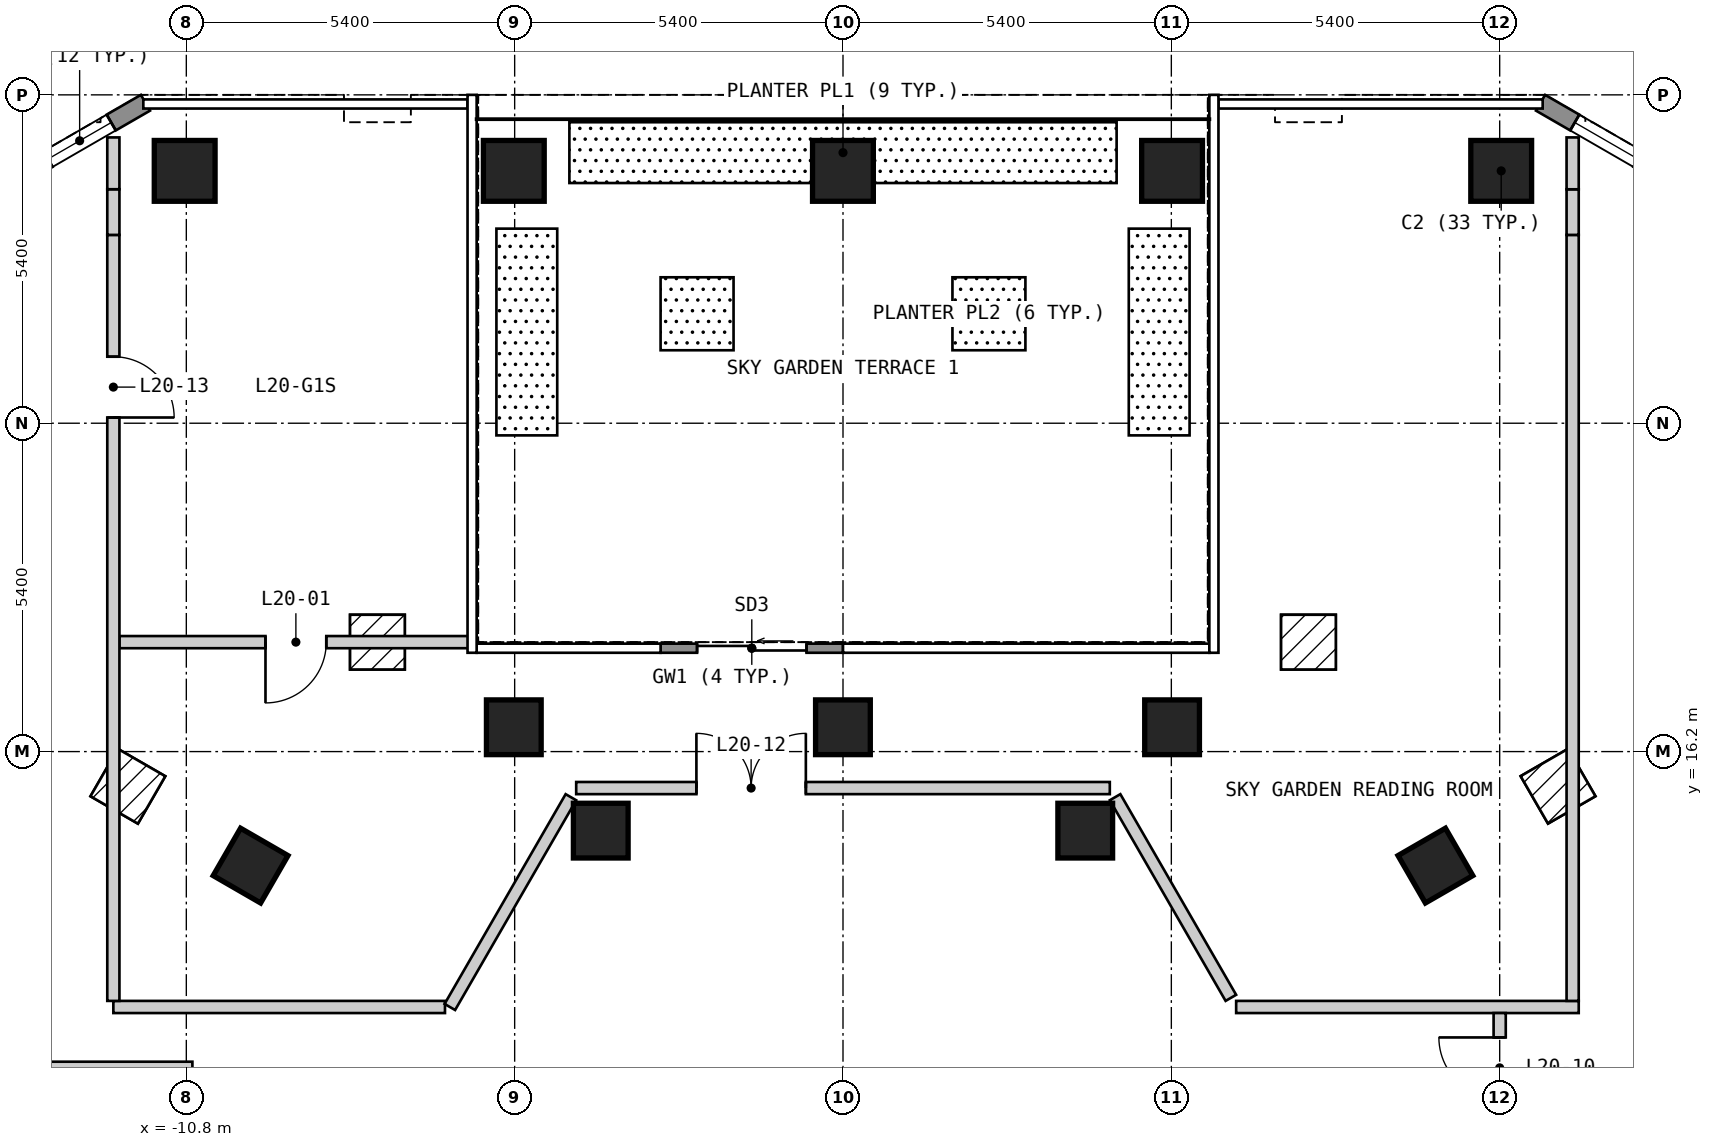
"""IFC4 building model, lengths in metres.
Left out: names, types, materials, properties, quantities, classifications, styles, units other than length and angle.
Written with IfcOpenShell. Run it as: python <this file> out.ifc"""

import sys

from ifc_helpers import new_model, si_unit, direction, frame, frame_2d, origin, origin_2d, place, context, subcontext, project, spatial, polyline, rectangle, outline, extrude, element, fill, save


model = new_model("IFC4")
c1 = context("Model", 3, precision=1e-05, world=origin(), true_north=direction((0.0, 1.0)))
c2 = subcontext(c1, "Body", "Model", "MODEL_VIEW")
j1 = project(units=[si_unit("LENGTHUNIT", "METRE"), si_unit("PLANEANGLEUNIT", "RADIAN")], contexts=[c1])
p1 = place(None, origin())
s1 = spatial("IfcSite", under=j1, at=p1, CompositionType="ELEMENT")
p2 = place(p1, origin())
s2 = spatial("IfcBuilding", under=s1, at=p2, CompositionType="ELEMENT")
p3 = place(p2, frame((0.0, 0.0, 66.0)))
s3 = spatial("IfcBuildingStorey", under=s2, at=p3, CompositionType="ELEMENT", Elevation=66.0)
for number, where, z_axis, x_axis in (
    (1, (10.825, 25.75, 0.0), (0.0, 0.0, 1.0), (-1.0, 0.0, 0.0)),
    (2, (5.412, 25.75, 0.0), (0.0, 0.0, 1.0), (-1.0, 0.0, 0.0)),
    (3, (-0.001, 25.75, 0.0), (0.0, 0.0, 1.0), (-1.0, 0.0, 0.0)),
    (4, (-5.414, 25.75, 0.0), (0.0, 0.0, 1.0), (-1.0, 0.0, 0.0)),
    (5, (-10.827, 25.75, 0.0), (0.0, 0.0, 1.0), (-1.0, 0.0, 0.0)),
):
    element("IfcColumn", number, at=place(p3, frame(where, z_axis=z_axis, x_axis=x_axis)), inside=s3, PredefinedType="COLUMN", context=c2, shape_type="SweptSolid", body=[
        extrude(rectangle(XDim=1.0, YDim=1.0, at=origin_2d()), origin(), (0.0, 0.0, 1.0), 6.0),
    ])
for number, where, z_axis, x_axis in (
    (6, (9.743, 14.325, 0.0), (0.0, 0.0, 1.0), (-0.5, 0.866, 0.0)),
    (7, (5.412, 16.6, 0.0), (0.0, 0.0, 1.0), (-1.0, 0.0, 0.0)),
    (8, (3.984, 14.9, 0.0), (0.0, 0.0, 1.0), (1.0, 0.0, 0.0)),
    (9, (-0.001, 16.6, 0.0), (0.0, 0.0, 1.0), (-1.0, 0.0, 0.0)),
    (10, (-3.984, 14.9, 0.0), (0.0, 0.0, 1.0), (1.0, 0.0, 0.0)),
    (11, (-5.414, 16.6, 0.0), (0.0, 0.0, 1.0), (-1.0, 0.0, 0.0)),
    (12, (-9.743, 14.325, 0.0), (0.0, 0.0, 1.0), (-0.5, -0.866, 0.0)),
):
    element("IfcColumn", number, at=place(p3, frame(where, z_axis=z_axis, x_axis=x_axis)), inside=s3, PredefinedType="COLUMN", context=c2, shape_type="SweptSolid", body=[
        extrude(rectangle(XDim=0.9, YDim=0.9, at=origin_2d()), origin(), (0.0, 0.0, 1.0), 6.0),
    ])
p4 = place(p3, frame((-11.472, 26.87, 0.0), z_axis=(0.0, 0.0, 1.0), x_axis=(-0.866022959057, -0.500004234368, 0.0)))
e13 = element("IfcWall", 13, at=p4, inside=s3, PredefinedType="SOLIDWALL", context=c2, shape_type="SweptSolid", body=[
    extrude(outline(polyline([(0.0, -0.15), (5.0, -0.15), (4.92, 0.15), (0.08, 0.15), (0.0, -0.15)])), origin(), (0.0, 0.0, 1.0), 5.7),
])
p5 = place(p4, frame((0.65, 0.0, 0.15)))
e14 = element("IfcOpeningElement", 14, at=p5, cuts=e13, PredefinedType="OPENING", context=c2, shape_type="SweptSolid", body=[
    extrude(rectangle(XDim=1.2, YDim=2.1, at=frame_2d((0.6, 1.05))), frame((0.0, 0.16, 0.0), z_axis=(0.0, -1.0, 0.0), x_axis=(1.0, 0.0, 0.0)), (0.0, 0.0, 1.0), 0.32),
])
p6 = place(p4, frame((3.149, 0.0, 0.15)))
e15 = element("IfcOpeningElement", 15, at=p6, cuts=e13, PredefinedType="OPENING", context=c2, shape_type="SweptSolid", body=[
    extrude(rectangle(XDim=1.2, YDim=2.1, at=frame_2d((0.6, 1.05))), frame((0.0, 0.16, 0.0), z_axis=(0.0, -1.0, 0.0), x_axis=(1.0, 0.0, 0.0)), (0.0, 0.0, 1.0), 0.32),
])
p7 = place(p3, frame((15.802, 24.37, 0.0), z_axis=(0.0, 0.0, 1.0), x_axis=(-0.866022959057, 0.500004234368, 0.0)))
e16 = element("IfcWall", 16, at=p7, inside=s3, PredefinedType="SOLIDWALL", context=c2, shape_type="SweptSolid", body=[
    extrude(outline(polyline([(0.0, -0.15), (5.0, -0.15), (4.92, 0.15), (0.08, 0.15), (0.0, -0.15)])), origin(), (0.0, 0.0, 1.0), 5.7),
])
p8 = place(p7, frame((0.65, 0.0, 0.15)))
e17 = element("IfcOpeningElement", 17, at=p8, cuts=e16, PredefinedType="OPENING", context=c2, shape_type="SweptSolid", body=[
    extrude(rectangle(XDim=1.2, YDim=2.1, at=frame_2d((0.6, 1.05))), frame((0.0, 0.16, 0.0), z_axis=(0.0, -1.0, 0.0), x_axis=(1.0, 0.0, 0.0)), (0.0, 0.0, 1.0), 0.32),
])
p9 = place(p7, frame((3.15, 0.0, 0.15)))
e18 = element("IfcOpeningElement", 18, at=p9, cuts=e16, PredefinedType="OPENING", context=c2, shape_type="SweptSolid", body=[
    extrude(rectangle(XDim=1.2, YDim=2.1, at=frame_2d((0.6, 1.05))), frame((0.0, 0.16, 0.0), z_axis=(0.0, -1.0, 0.0), x_axis=(1.0, 0.0, 0.0)), (0.0, 0.0, 1.0), 0.32),
])
p10 = place(p3, frame((0.0, 17.9, 0.0), z_axis=(0.0, 0.0, 1.0), x_axis=(-1.0, 0.0, 0.0)))
e19 = element("IfcWall", 19, at=p10, inside=s3, PredefinedType="SOLIDWALL", context=c2, shape_type="SweptSolid", body=[
    extrude(rectangle(XDim=3.0, YDim=0.15, at=frame_2d((1.5, 0.0))), origin(), (0.0, 0.0, 1.0), 5.7),
])
p11 = place(p10, frame((0.6, 0.0, 0.0)))
e20 = element("IfcOpeningElement", 20, at=p11, cuts=e19, PredefinedType="OPENING", context=c2, shape_type="SweptSolid", body=[
    extrude(rectangle(XDim=1.8, YDim=2.4, at=frame_2d((0.9, 1.2))), frame((0.0, 0.085, 0.0), z_axis=(0.0, -1.0, 0.0), x_axis=(1.0, 0.0, 0.0)), (0.0, 0.0, 1.0), 0.17),
])
p12 = place(p3, frame((-21.853, 11.0, 0.0), z_axis=(0.0, 0.0, 1.0), x_axis=(1.0, 0.0, 0.0)))
e21 = element("IfcWall", 21, at=p12, inside=s3, PredefinedType="PARTITIONING", context=c2, shape_type="SweptSolid", body=[
    extrude(rectangle(XDim=11.153, YDim=0.2, at=frame_2d((5.577, 0.0))), origin(), (0.0, 0.0, 1.0), 5.7),
])
p13 = place(p12, frame((5.691, 0.0, 0.0), z_axis=(0.0, 0.0, 1.0), x_axis=(-1.0, 0.0, 0.0)))
e22 = element("IfcOpeningElement", 22, at=p13, cuts=e21, PredefinedType="OPENING", context=c2, shape_type="SweptSolid", body=[
    extrude(rectangle(XDim=1.8, YDim=2.1, at=frame_2d((0.9, 1.05))), frame((0.0, 0.11, 0.0), z_axis=(0.0, -1.0, 0.0), x_axis=(1.0, 0.0, 0.0)), (0.0, 0.0, 1.0), 0.22),
])
p14 = place(p3, frame((-12.0, 12.0, 0.0), z_axis=(0.0, 0.0, 1.0), x_axis=(1.0, 0.0, 0.0)))
e23 = element("IfcWall", 23, at=p14, inside=s3, PredefinedType="PARTITIONING", context=c2, shape_type="SweptSolid", body=[
    extrude(rectangle(XDim=5.454, YDim=0.2, at=frame_2d((2.727, 0.0))), origin(), (0.0, 0.0, 1.0), 5.7),
])
p15 = place(p3, frame((6.466, 12.0, 0.0), z_axis=(0.0, 0.0, 1.0), x_axis=(1.0, 0.0, 0.0)))
e24 = element("IfcWall", 24, at=p15, inside=s3, PredefinedType="PARTITIONING", context=c2, shape_type="SweptSolid", body=[
    extrude(rectangle(XDim=5.634, YDim=0.2, at=frame_2d((2.817, 0.0))), origin(), (0.0, 0.0, 1.0), 5.7),
])
p16 = place(p3, frame((-4.388, 15.6, 0.0), z_axis=(0.0, 0.0, 1.0), x_axis=(1.0, 0.0, 0.0)))
e25 = element("IfcWall", 25, at=p16, inside=s3, PredefinedType="PARTITIONING", context=c2, shape_type="SweptSolid", body=[
    extrude(rectangle(XDim=8.776, YDim=0.2, at=frame_2d((4.388, 0.0))), origin(), (0.0, 0.0, 1.0), 5.7),
])
p17 = place(p16, frame((1.977, 0.0, 0.0)))
e26 = element("IfcOpeningElement", 26, at=p17, cuts=e25, PredefinedType="OPENING", context=c2, shape_type="SweptSolid", body=[
    extrude(rectangle(XDim=1.8, YDim=2.1, at=frame_2d((0.9, 1.05))), frame((0.0, 0.11, 0.0), z_axis=(0.0, -1.0, 0.0), x_axis=(1.0, 0.0, 0.0)), (0.0, 0.0, 1.0), 0.22),
])
p18 = place(p3, frame((-11.9, 18.0, 0.0), z_axis=(0.0, 0.0, 1.0), x_axis=(1.0, 0.0, 0.0)))
e27 = element("IfcWall", 27, at=p18, inside=s3, PredefinedType="PARTITIONING", context=c2, shape_type="SweptSolid", body=[
    extrude(rectangle(XDim=5.82, YDim=0.2, at=frame_2d((2.91, 0.0))), origin(), (0.0, 0.0, 1.0), 5.7),
])
p19 = place(p18, frame((3.402, 0.0, 0.0), z_axis=(0.0, 0.0, 1.0), x_axis=(-1.0, 0.0, 0.0)))
e28 = element("IfcOpeningElement", 28, at=p19, cuts=e27, PredefinedType="OPENING", context=c2, shape_type="SweptSolid", body=[
    extrude(rectangle(XDim=1.0, YDim=2.1, at=frame_2d((0.5, 1.05))), frame((0.0, 0.11, 0.0), z_axis=(0.0, -1.0, 0.0), x_axis=(1.0, 0.0, 0.0)), (0.0, 0.0, 1.0), 0.22),
])
p20 = place(p3, frame((-12.0, 12.1, 0.0), z_axis=(0.0, 0.0, 1.0), x_axis=(0.0, 1.0, 0.0)))
e29 = element("IfcWall", 29, at=p20, inside=s3, PredefinedType="PARTITIONING", context=c2, shape_type="SweptSolid", body=[
    extrude(rectangle(XDim=12.597, YDim=0.2, at=frame_2d((6.298, 0.0))), origin(), (0.0, 0.0, 1.0), 5.7),
])
p21 = place(p20, frame((10.594, 0.0, 0.0), z_axis=(0.0, 0.0, 1.0), x_axis=(-1.0, 0.0, 0.0)))
e30 = element("IfcOpeningElement", 30, at=p21, cuts=e29, PredefinedType="OPENING", context=c2, shape_type="SweptSolid", body=[
    extrude(rectangle(XDim=1.0, YDim=2.1, at=frame_2d((0.5, 1.05))), frame((0.0, 0.11, 0.0), z_axis=(0.0, -1.0, 0.0), x_axis=(1.0, 0.0, 0.0)), (0.0, 0.0, 1.0), 0.22),
])
p22 = place(p3, frame((-12.0, 24.697, 0.0), z_axis=(0.0, 0.0, 1.0), x_axis=(0.0, 1.0, 0.0)))
e31 = element("IfcWall", 31, at=p22, inside=s3, PredefinedType="PARTITIONING", context=c2, shape_type="SweptSolid", body=[
    extrude(rectangle(XDim=0.751, YDim=0.2, at=frame_2d((0.375, 0.0))), origin(), (0.0, 0.0, 1.0), 5.02),
])
p23 = place(p3, frame((-12.0, 25.448, 0.0), z_axis=(0.0, 0.0, 1.0), x_axis=(0.0, 1.0, 0.0)))
e32 = element("IfcWall", 32, at=p23, inside=s3, PredefinedType="PARTITIONING", context=c2, shape_type="SweptSolid", body=[
    extrude(rectangle(XDim=0.852, YDim=0.2, at=frame_2d((0.426, 0.0))), origin(), (0.0, 0.0, 1.0), 5.7),
])
p24 = place(p3, frame((10.8, 4.894, 0.0), z_axis=(0.0, 0.0, 1.0), x_axis=(0.0, 1.0, 0.0)))
e33 = element("IfcWall", 33, at=p24, inside=s3, PredefinedType="PARTITIONING", context=c2, shape_type="SweptSolid", body=[
    extrude(rectangle(XDim=7.006, YDim=0.2, at=frame_2d((3.503, 0.0))), origin(), (0.0, 0.0, 1.0), 5.7),
])
p25 = place(p24, frame((2.905, 0.0, 0.0), z_axis=(0.0, 0.0, 1.0), x_axis=(-1.0, 0.0, 0.0)))
e34 = element("IfcOpeningElement", 34, at=p25, cuts=e33, PredefinedType="OPENING", context=c2, shape_type="SweptSolid", body=[
    extrude(rectangle(XDim=1.8, YDim=2.1, at=frame_2d((0.9, 1.05))), frame((0.0, 0.11, 0.0), z_axis=(0.0, -1.0, 0.0), x_axis=(1.0, 0.0, 0.0)), (0.0, 0.0, 1.0), 0.22),
])
p26 = place(p24, frame((6.605, 0.0, 0.0), z_axis=(0.0, 0.0, 1.0), x_axis=(-1.0, 0.0, 0.0)))
e35 = element("IfcOpeningElement", 35, at=p26, cuts=e33, PredefinedType="OPENING", context=c2, shape_type="SweptSolid", body=[
    extrude(rectangle(XDim=1.0, YDim=2.1, at=frame_2d((0.5, 1.05))), frame((0.0, 0.11, 0.0), z_axis=(0.0, -1.0, 0.0), x_axis=(1.0, 0.0, 0.0)), (0.0, 0.0, 1.0), 0.22),
])
p27 = place(p3, frame((12.0, 12.1, 0.0), z_axis=(0.0, 0.0, 1.0), x_axis=(0.0, 1.0, 0.0)))
e36 = element("IfcWall", 36, at=p27, inside=s3, PredefinedType="PARTITIONING", context=c2, shape_type="SweptSolid", body=[
    extrude(rectangle(XDim=12.597, YDim=0.2, at=frame_2d((6.298, 0.0))), origin(), (0.0, 0.0, 1.0), 5.7),
])
p28 = place(p3, frame((12.0, 24.697, 0.0), z_axis=(0.0, 0.0, 1.0), x_axis=(0.0, 1.0, 0.0)))
e37 = element("IfcWall", 37, at=p28, inside=s3, PredefinedType="PARTITIONING", context=c2, shape_type="SweptSolid", body=[
    extrude(rectangle(XDim=0.75, YDim=0.2, at=frame_2d((0.375, 0.0))), origin(), (0.0, 0.0, 1.0), 5.02),
])
p29 = place(p3, frame((12.0, 25.447, 0.0), z_axis=(0.0, 0.0, 1.0), x_axis=(0.0, 1.0, 0.0)))
e38 = element("IfcWall", 38, at=p29, inside=s3, PredefinedType="PARTITIONING", context=c2, shape_type="SweptSolid", body=[
    extrude(rectangle(XDim=0.853, YDim=0.2, at=frame_2d((0.427, 0.0))), origin(), (0.0, 0.0, 1.0), 5.7),
])
p30 = place(p3, frame((4.475, 15.45, 0.0), z_axis=(0.0, 0.0, 1.0), x_axis=(0.499709509062, -0.866193053859, 0.0)))
e39 = element("IfcWall", 39, at=p30, inside=s3, PredefinedType="PARTITIONING", context=c2, shape_type="SweptSolid", body=[
    extrude(rectangle(XDim=3.81, YDim=0.2, at=frame_2d((1.905, 0.0))), origin(), (0.0, 0.0, 1.0), 5.7),
])
p31 = place(p3, frame((-6.466, 12.0, 0.0), z_axis=(0.0, 0.0, 1.0), x_axis=(0.49983741437, 0.866119252295, 0.0)))
e40 = element("IfcWall", 40, at=p31, inside=s3, PredefinedType="PARTITIONING", context=c2, shape_type="SweptSolid", body=[
    extrude(rectangle(XDim=3.983, YDim=0.2, at=frame_2d((1.992, 0.0))), origin(), (0.0, 0.0, 1.0), 5.7),
])
p32 = place(p5, origin())
e41 = element("IfcWindow", 41, at=p32, inside=s3, PartitioningType="SINGLE_PANEL", PredefinedType="WINDOW", context=c2, shape_type="SweptSolid", body=[
    extrude(rectangle(XDim=1.2, YDim=2.1, at=frame_2d((0.6, 1.05))), frame((0.0, 0.03, 0.0), z_axis=(0.0, -1.0, 0.0), x_axis=(1.0, 0.0, 0.0)), (0.0, 0.0, 1.0), 0.06),
])
fill(e14, e41)
p33 = place(p9, origin())
e42 = element("IfcWindow", 42, at=p33, inside=s3, PartitioningType="SINGLE_PANEL", PredefinedType="WINDOW", context=c2, shape_type="SweptSolid", body=[
    extrude(rectangle(XDim=1.2, YDim=2.1, at=frame_2d((0.6, 1.05))), frame((0.0, 0.03, 0.0), z_axis=(0.0, -1.0, 0.0), x_axis=(1.0, 0.0, 0.0)), (0.0, 0.0, 1.0), 0.06),
])
fill(e18, e42)
p34 = place(p11, origin())
e43 = element("IfcDoor", 43, at=p34, inside=s3, OperationType="SLIDING_TO_LEFT", PredefinedType="DOOR", context=c2, shape_type="SweptSolid", body=[
    extrude(rectangle(XDim=1.8, YDim=2.4, at=frame_2d((0.9, 1.2))), frame((0.0, 0.025, 0.0), z_axis=(0.0, -1.0, 0.0), x_axis=(1.0, 0.0, 0.0)), (0.0, 0.0, 1.0), 0.05),
])
fill(e20, e43)
p35 = place(p19, origin())
e44 = element("IfcDoor", 44, at=p35, inside=s3, OperationType="SINGLE_SWING_RIGHT", PredefinedType="DOOR", context=c2, shape_type="SweptSolid", body=[
    extrude(rectangle(XDim=1.0, YDim=2.1, at=frame_2d((0.5, 1.05))), frame((0.0, 0.025, 0.0), z_axis=(0.0, -1.0, 0.0), x_axis=(1.0, 0.0, 0.0)), (0.0, 0.0, 1.0), 0.05),
])
fill(e28, e44)
p36 = place(p26, origin())
e45 = element("IfcDoor", 45, at=p36, inside=s3, OperationType="SINGLE_SWING_LEFT", PredefinedType="DOOR", context=c2, shape_type="SweptSolid", body=[
    extrude(rectangle(XDim=1.0, YDim=2.1, at=frame_2d((0.5, 1.05))), frame((0.0, 0.025, 0.0), z_axis=(0.0, -1.0, 0.0), x_axis=(1.0, 0.0, 0.0)), (0.0, 0.0, 1.0), 0.05),
])
fill(e35, e45)
p37 = place(p17, origin())
e46 = element("IfcDoor", 46, at=p37, inside=s3, OperationType="DOUBLE_DOOR_SINGLE_SWING", PredefinedType="DOOR", context=c2, shape_type="SweptSolid", body=[
    extrude(rectangle(XDim=1.8, YDim=2.1, at=frame_2d((0.9, 1.05))), frame((0.0, 0.025, 0.0), z_axis=(0.0, -1.0, 0.0), x_axis=(1.0, 0.0, 0.0)), (0.0, 0.0, 1.0), 0.05),
])
fill(e26, e46)
p38 = place(p21, origin())
e47 = element("IfcDoor", 47, at=p38, inside=s3, OperationType="SINGLE_SWING_RIGHT", PredefinedType="DOOR", context=c2, shape_type="SweptSolid", body=[
    extrude(rectangle(XDim=1.0, YDim=2.1, at=frame_2d((0.5, 1.05))), frame((0.0, 0.025, 0.0), z_axis=(0.0, -1.0, 0.0), x_axis=(1.0, 0.0, 0.0)), (0.0, 0.0, 1.0), 0.05),
])
fill(e30, e47)
save(model, sys.argv[1])
